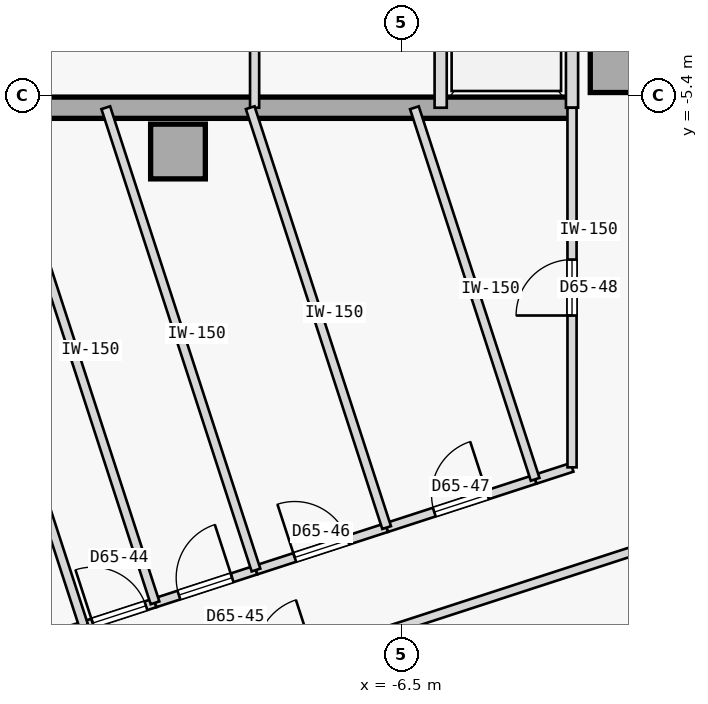
"""IFC4 building model, lengths in metres.
Left out: names, types, materials, properties, quantities, classifications, styles, units other than length and angle.
Written with IfcOpenShell. Run it as: python <this file> out.ifc"""

import sys

from ifc_helpers import new_model, si_unit, direction, frame, frame_2d, origin, origin_2d, place, context, subcontext, project, spatial, rectangle, extrude, element, fill, save


model = new_model("IFC4")
c1 = context("Model", 3, precision=1e-05, world=origin(), true_north=direction((0.0, 1.0)))
c2 = subcontext(c1, "Body", "Model", "MODEL_VIEW")
j1 = project(units=[si_unit("LENGTHUNIT", "METRE"), si_unit("PLANEANGLEUNIT", "RADIAN")], contexts=[c1])
p1 = place(None, origin())
s1 = spatial("IfcSite", under=j1, at=p1, CompositionType="ELEMENT")
p2 = place(p1, origin())
s2 = spatial("IfcBuilding", under=s1, at=p2, CompositionType="ELEMENT")
p3 = place(p2, frame((0.0, 0.0, 244.4)))
s3 = spatial("IfcBuildingStorey", under=s2, at=p3, CompositionType="ELEMENT", Elevation=244.4)
for number, where, z_axis, x_axis in (
    (1, (-10.18, -6.32, 0.0), (0.0, 0.0, 1.0), (1.0, 0.0, 0.0)),
    (2, (-2.95, -4.9, 0.0), (0.0, 0.0, 1.0), (1.0, 0.0, 0.0)),
):
    element("IfcColumn", number, at=place(p3, frame(where, z_axis=z_axis, x_axis=x_axis)), inside=s3, PredefinedType="COLUMN", context=c2, shape_type="SweptSolid", body=[
        extrude(rectangle(XDim=0.9, YDim=0.9, at=origin_2d()), origin(), (0.0, 0.0, 1.0), 3.35),
    ])
p4 = place(p3, frame((-14.56, -5.6, 0.0), z_axis=(0.0, 0.0, 1.0), x_axis=(1.0, 0.0, 0.0)))
e3 = element("IfcWall", 3, at=p4, inside=s3, PredefinedType="SHEAR", context=c2, shape_type="SweptSolid", body=[
    extrude(rectangle(XDim=10.86, YDim=0.35, at=frame_2d((5.43, 0.0))), origin(), (0.0, 0.0, 1.0), 3.125),
])
for number, where, z_axis, x_axis in (
    (4, (-3.7, -5.6, 0.0), (0.0, 0.0, 1.0), (0.0, 1.0, 0.0)),
    (5, (-5.86, -5.6, 0.0), (0.0, 0.0, 1.0), (0.0, 1.0, 0.0)),
):
    element("IfcWall", number, at=place(p3, frame(where, z_axis=z_axis, x_axis=x_axis)), inside=s3, PredefinedType="STANDARD", context=c2, shape_type="SweptSolid", body=[
        extrude(rectangle(XDim=2.65, YDim=0.2, at=frame_2d((1.325, 0.0))), origin(), (0.0, 0.0, 1.0), 3.125),
    ])
p5 = place(p3, frame((-8.92, -5.6, 0.0), z_axis=(0.0, 0.0, 1.0), x_axis=(0.0, 1.0, 0.0)))
e6 = element("IfcWall", 6, at=p5, inside=s3, PredefinedType="PARTITIONING", context=c2, shape_type="SweptSolid", body=[
    extrude(rectangle(XDim=2.65, YDim=0.15, at=frame_2d((1.325, 0.0))), origin(), (0.0, 0.0, 1.0), 3.125),
])
p6 = place(p3, frame((-16.242, -17.292, 0.0), z_axis=(0.0, 0.0, 1.0), x_axis=(0.951056800106, 0.309016120894, 0.0)))
e7 = element("IfcWall", 7, at=p6, inside=s3, PredefinedType="PARTITIONING", context=c2, shape_type="SweptSolid", body=[
    extrude(rectangle(XDim=16.494, YDim=0.15, at=frame_2d((8.247, 0.0))), origin(), (0.0, 0.0, 1.0), 3.125),
])
p7 = place(p6, frame((7.772, 0.0, 0.0)))
e8 = element("IfcOpeningElement", 8, at=p7, cuts=e7, PredefinedType="OPENING", context=c2, shape_type="SweptSolid", body=[
    extrude(rectangle(XDim=0.95, YDim=2.15, at=frame_2d((0.475, 1.075))), frame((0.0, 0.085, 0.0), z_axis=(0.0, -1.0, 0.0), x_axis=(1.0, 0.0, 0.0)), (0.0, 0.0, 1.0), 0.17),
])
p8 = place(p3, frame((-29.45, -19.881, 0.0), z_axis=(0.0, 0.0, 1.0), x_axis=(0.95105650271, 0.309017036186, 0.0)))
e9 = element("IfcWall", 9, at=p8, inside=s3, PredefinedType="PARTITIONING", context=c2, shape_type="SweptSolid", body=[
    extrude(rectangle(XDim=18.632, YDim=0.15, at=frame_2d((9.316, 0.0))), origin(), (0.0, 0.0, 1.0), 3.125),
])
p9 = place(p8, frame((8.856, 0.0, 0.0)))
e10 = element("IfcOpeningElement", 10, at=p9, cuts=e9, PredefinedType="OPENING", context=c2, shape_type="SweptSolid", body=[
    extrude(rectangle(XDim=0.92, YDim=2.15, at=frame_2d((0.46, 1.075))), frame((0.0, 0.085, 0.0), z_axis=(0.0, -1.0, 0.0), x_axis=(1.0, 0.0, 0.0)), (0.0, 0.0, 1.0), 0.17),
])
p10 = place(p3, frame((-11.73, -14.123, 0.0), z_axis=(0.0, 0.0, 1.0), x_axis=(0.951032613602, 0.309090549622, 0.0)))
e11 = element("IfcWall", 11, at=p10, inside=s3, PredefinedType="PARTITIONING", context=c2, shape_type="SweptSolid", body=[
    extrude(rectangle(XDim=1.233, YDim=0.15, at=frame_2d((0.616, 0.0))), origin(), (0.0, 0.0, 1.0), 3.125),
])
p11 = place(p10, frame((0.156, 0.0, 0.0)))
e12 = element("IfcOpeningElement", 12, at=p11, cuts=e11, PredefinedType="OPENING", context=c2, shape_type="SweptSolid", body=[
    extrude(rectangle(XDim=0.92, YDim=2.15, at=frame_2d((0.46, 1.075))), frame((0.0, 0.085, 0.0), z_axis=(0.0, -1.0, 0.0), x_axis=(1.0, 0.0, 0.0)), (0.0, 0.0, 1.0), 0.17),
])
p12 = place(p3, frame((-10.558, -13.742, 0.0), z_axis=(0.0, 0.0, 1.0), x_axis=(0.951060780507, 0.309003870173, 0.0)))
e13 = element("IfcWall", 13, at=p12, inside=s3, PredefinedType="PARTITIONING", context=c2, shape_type="SweptSolid", body=[
    extrude(rectangle(XDim=1.746, YDim=0.15, at=frame_2d((0.873, 0.0))), origin(), (0.0, 0.0, 1.0), 3.125),
])
p13 = place(p12, frame((0.413, 0.0, 0.0)))
e14 = element("IfcOpeningElement", 14, at=p13, cuts=e13, PredefinedType="OPENING", context=c2, shape_type="SweptSolid", body=[
    extrude(rectangle(XDim=0.92, YDim=2.15, at=frame_2d((0.46, 1.075))), frame((0.0, 0.085, 0.0), z_axis=(0.0, -1.0, 0.0), x_axis=(1.0, 0.0, 0.0)), (0.0, 0.0, 1.0), 0.17),
])
p14 = place(p3, frame((-8.897, -13.202, 0.0), z_axis=(0.0, 0.0, 1.0), x_axis=(0.951065832698, 0.308988319964, 0.0)))
e15 = element("IfcWall", 15, at=p14, inside=s3, PredefinedType="PARTITIONING", context=c2, shape_type="SweptSolid", body=[
    extrude(rectangle(XDim=2.259, YDim=0.15, at=frame_2d((1.129, 0.0))), origin(), (0.0, 0.0, 1.0), 3.125),
])
p15 = place(p14, frame((0.669, 0.0, 0.0)))
e16 = element("IfcOpeningElement", 16, at=p15, cuts=e15, PredefinedType="OPENING", context=c2, shape_type="SweptSolid", body=[
    extrude(rectangle(XDim=0.92, YDim=2.15, at=frame_2d((0.46, 1.075))), frame((0.0, 0.085, 0.0), z_axis=(0.0, -1.0, 0.0), x_axis=(1.0, 0.0, 0.0)), (0.0, 0.0, 1.0), 0.17),
])
p16 = place(p3, frame((-6.749, -12.504, 0.0), z_axis=(0.0, 0.0, 1.0), x_axis=(0.951042451835, 0.309060276981, 0.0)))
e17 = element("IfcWall", 17, at=p16, inside=s3, PredefinedType="PARTITIONING", context=c2, shape_type="SweptSolid", body=[
    extrude(rectangle(XDim=2.568, YDim=0.15, at=frame_2d((1.284, 0.0))), origin(), (0.0, 0.0, 1.0), 3.125),
])
p17 = place(p16, frame((0.824, 0.0, 0.0)))
e18 = element("IfcOpeningElement", 18, at=p17, cuts=e17, PredefinedType="OPENING", context=c2, shape_type="SweptSolid", body=[
    extrude(rectangle(XDim=0.92, YDim=2.15, at=frame_2d((0.46, 1.075))), frame((0.0, 0.085, 0.0), z_axis=(0.0, -1.0, 0.0), x_axis=(1.0, 0.0, 0.0)), (0.0, 0.0, 1.0), 0.17),
])
p18 = place(p3, frame((-4.306, -11.711, 0.0), z_axis=(0.0, 0.0, 1.0), x_axis=(0.95110436063, 0.308869705847, 0.0)))
e19 = element("IfcWall", 19, at=p18, inside=s3, PredefinedType="PARTITIONING", context=c2, shape_type="SweptSolid", body=[
    extrude(rectangle(XDim=0.638, YDim=0.15, at=frame_2d((0.319, 0.0))), origin(), (0.0, 0.0, 1.0), 3.125),
])
p19 = place(p3, frame((-3.7, -11.514, 0.0), z_axis=(0.0, 0.0, 1.0), x_axis=(-8.2572974e-05, 0.999999996591, 0.0)))
e20 = element("IfcWall", 20, at=p19, inside=s3, PredefinedType="PARTITIONING", context=c2, shape_type="SweptSolid", body=[
    extrude(rectangle(XDim=5.913, YDim=0.15, at=frame_2d((2.957, 0.0))), origin(), (0.0, 0.0, 1.0), 3.125),
])
p20 = place(p19, frame((2.497, 0.0, 0.0)))
e21 = element("IfcOpeningElement", 21, at=p20, cuts=e20, PredefinedType="OPENING", context=c2, shape_type="SweptSolid", body=[
    extrude(rectangle(XDim=0.92, YDim=2.15, at=frame_2d((0.46, 1.075))), frame((0.0, 0.085, 0.0), z_axis=(0.0, -1.0, 0.0), x_axis=(1.0, 0.0, 0.0)), (0.0, 0.0, 1.0), 0.17),
])
p21 = place(p3, frame((-11.73, -14.123, 0.0), z_axis=(0.0, 0.0, 1.0), x_axis=(-0.309062621189, 0.951041690035, 0.0)))
e22 = element("IfcWall", 22, at=p21, inside=s3, PredefinedType="PARTITIONING", context=c2, shape_type="SweptSolid", body=[
    extrude(rectangle(XDim=2.354, YDim=0.15, at=frame_2d((1.177, 0.0))), origin(), (0.0, 0.0, 1.0), 3.125),
])
p22 = place(p3, frame((-10.558, -13.742, 0.0), z_axis=(0.0, 0.0, 1.0), x_axis=(-0.309023521796, 0.951054395383, 0.0)))
e23 = element("IfcWall", 23, at=p22, inside=s3, PredefinedType="PARTITIONING", context=c2, shape_type="SweptSolid", body=[
    extrude(rectangle(XDim=8.561, YDim=0.15, at=frame_2d((4.28, 0.0))), origin(), (0.0, 0.0, 1.0), 3.125),
])
p23 = place(p3, frame((-8.897, -13.202, 0.0), z_axis=(0.0, 0.0, 1.0), x_axis=(-0.309008036968, 0.951059426687, 0.0)))
e24 = element("IfcWall", 24, at=p23, inside=s3, PredefinedType="PARTITIONING", context=c2, shape_type="SweptSolid", body=[
    extrude(rectangle(XDim=7.994, YDim=0.15, at=frame_2d((3.997, 0.0))), origin(), (0.0, 0.0, 1.0), 3.125),
])
p24 = place(p3, frame((-6.749, -12.504, 0.0), z_axis=(0.0, 0.0, 1.0), x_axis=(-0.309005471061, 0.95106026037, 0.0)))
e25 = element("IfcWall", 25, at=p24, inside=s3, PredefinedType="PARTITIONING", context=c2, shape_type="SweptSolid", body=[
    extrude(rectangle(XDim=7.26, YDim=0.15, at=frame_2d((3.63, 0.0))), origin(), (0.0, 0.0, 1.0), 3.125),
])
p25 = place(p3, frame((-4.306, -11.711, 0.0), z_axis=(0.0, 0.0, 1.0), x_axis=(-0.309048266124, 0.951046354919, 0.0)))
e26 = element("IfcWall", 26, at=p25, inside=s3, PredefinedType="PARTITIONING", context=c2, shape_type="SweptSolid", body=[
    extrude(rectangle(XDim=6.425, YDim=0.15, at=frame_2d((3.212, 0.0))), origin(), (0.0, 0.0, 1.0), 3.125),
])
p26 = place(p11, origin())
e27 = element("IfcDoor", 27, at=p26, inside=s3, OperationType="SINGLE_SWING_LEFT", PredefinedType="DOOR", context=c2, shape_type="SweptSolid", body=[
    extrude(rectangle(XDim=0.92, YDim=2.15, at=frame_2d((0.46, 1.075))), frame((0.0, 0.025, 0.0), z_axis=(0.0, -1.0, 0.0), x_axis=(1.0, 0.0, 0.0)), (0.0, 0.0, 1.0), 0.05),
])
fill(e12, e27)
p27 = place(p13, origin())
e28 = element("IfcDoor", 28, at=p27, inside=s3, OperationType="SINGLE_SWING_RIGHT", PredefinedType="DOOR", context=c2, shape_type="SweptSolid", body=[
    extrude(rectangle(XDim=0.92, YDim=2.15, at=frame_2d((0.46, 1.075))), frame((0.0, 0.025, 0.0), z_axis=(0.0, -1.0, 0.0), x_axis=(1.0, 0.0, 0.0)), (0.0, 0.0, 1.0), 0.05),
])
fill(e14, e28)
p28 = place(p15, origin())
e29 = element("IfcDoor", 29, at=p28, inside=s3, OperationType="SINGLE_SWING_LEFT", PredefinedType="DOOR", context=c2, shape_type="SweptSolid", body=[
    extrude(rectangle(XDim=0.92, YDim=2.15, at=frame_2d((0.46, 1.075))), frame((0.0, 0.025, 0.0), z_axis=(0.0, -1.0, 0.0), x_axis=(1.0, 0.0, 0.0)), (0.0, 0.0, 1.0), 0.05),
])
fill(e16, e29)
p29 = place(p17, origin())
e30 = element("IfcDoor", 30, at=p29, inside=s3, OperationType="SINGLE_SWING_RIGHT", PredefinedType="DOOR", context=c2, shape_type="SweptSolid", body=[
    extrude(rectangle(XDim=0.92, YDim=2.15, at=frame_2d((0.46, 1.075))), frame((0.0, 0.025, 0.0), z_axis=(0.0, -1.0, 0.0), x_axis=(1.0, 0.0, 0.0)), (0.0, 0.0, 1.0), 0.05),
])
fill(e18, e30)
p30 = place(p20, origin())
e31 = element("IfcDoor", 31, at=p30, inside=s3, OperationType="SINGLE_SWING_LEFT", PredefinedType="DOOR", context=c2, shape_type="SweptSolid", body=[
    extrude(rectangle(XDim=0.92, YDim=2.15, at=frame_2d((0.46, 1.075))), frame((0.0, 0.025, 0.0), z_axis=(0.0, -1.0, 0.0), x_axis=(1.0, 0.0, 0.0)), (0.0, 0.0, 1.0), 0.05),
])
fill(e21, e31)
save(model, sys.argv[1])
